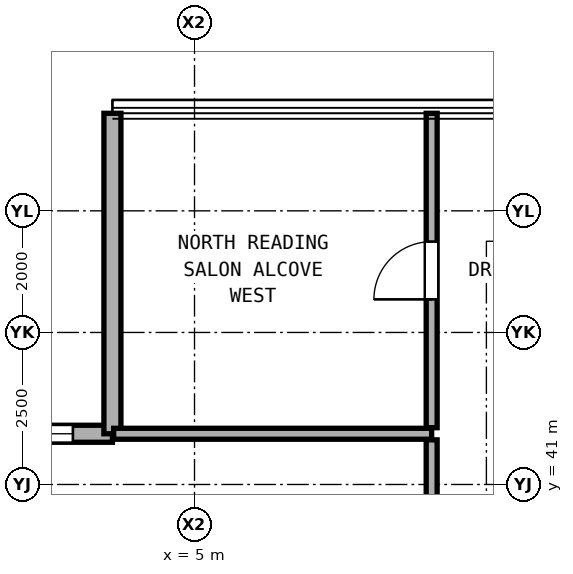
"""IFC4 building model, lengths in metres.
Left out: names, types, materials, properties, quantities, classifications, styles, units other than length and angle.
Written with IfcOpenShell. Run it as: python <this file> out.ifc"""

import sys

from ifc_helpers import new_model, si_unit, direction, frame, frame_2d, origin, place, context, subcontext, project, spatial, rectangle, extrude, element, fill, save


model = new_model("IFC4")
c1 = context("Model", 3, precision=1e-05, world=origin(), true_north=direction((0.0, 1.0)))
c2 = subcontext(c1, "Body", "Model", "MODEL_VIEW")
j1 = project(units=[si_unit("LENGTHUNIT", "METRE"), si_unit("PLANEANGLEUNIT", "RADIAN")], contexts=[c1])
p1 = place(None, origin())
s1 = spatial("IfcSite", under=j1, at=p1, CompositionType="ELEMENT")
p2 = place(p1, origin())
s2 = spatial("IfcBuilding", under=s1, at=p2, CompositionType="ELEMENT")
p3 = place(p2, frame((0.0, 0.0, 144.5)))
s3 = spatial("IfcBuildingStorey", under=s2, at=p3, CompositionType="ELEMENT", Elevation=144.5)
p4 = place(p3, frame((3.65, 41.834, 0.0), z_axis=(0.0, 0.0, 1.0), x_axis=(-1.0, 0.0, 0.0)))
e1 = element("IfcWall", 1, at=p4, inside=s3, PredefinedType="SOLIDWALL", context=c2, shape_type="SweptSolid", body=[
    extrude(rectangle(XDim=5.27, YDim=0.28, at=frame_2d((2.635, 0.0))), origin(), (0.0, 0.0, 1.0), 2.56),
])
p5 = place(p4, frame((0.65, 0.0, 0.41)))
e2 = element("IfcOpeningElement", 2, at=p5, cuts=e1, PredefinedType="OPENING", context=c2, shape_type="SweptSolid", body=[
    extrude(rectangle(XDim=1.1, YDim=2.0, at=frame_2d((0.55, 1.0))), frame((0.0, 0.15, 0.0), z_axis=(0.0, -1.0, 0.0), x_axis=(1.0, 0.0, 0.0)), (0.0, 0.0, 1.0), 0.3),
])
p6 = place(p3, frame((3.65, 47.104, 0.0), z_axis=(0.0, 0.0, 1.0), x_axis=(0.0, -1.0, 0.0)))
e3 = element("IfcWall", 3, at=p6, inside=s3, PredefinedType="SOLIDWALL", context=c2, shape_type="SweptSolid", body=[
    extrude(rectangle(XDim=5.27, YDim=0.28, at=frame_2d((2.635, 0.0))), origin(), (0.0, 0.0, 1.0), 2.56),
])
p7 = place(p3, frame((3.67, 41.834, 0.0), z_axis=(0.0, 0.0, 1.0), x_axis=(1.0, 0.0, 0.0)))
e4 = element("IfcWall", 4, at=p7, inside=s3, PredefinedType="PARTITIONING", context=c2, shape_type="SweptSolid", body=[
    extrude(rectangle(XDim=5.23, YDim=0.18, at=frame_2d((2.615, 0.0))), origin(), (0.0, 0.0, 1.0), 2.94),
])
p8 = place(p3, frame((8.9, 37.405, 0.0), z_axis=(0.0, 0.0, 1.0), x_axis=(0.0, 1.0, 0.0)))
e5 = element("IfcWall", 5, at=p8, inside=s3, PredefinedType="PARTITIONING", context=c2, shape_type="SweptSolid", body=[
    extrude(rectangle(XDim=4.329, YDim=0.18, at=frame_2d((2.165, 0.0))), origin(), (0.0, 0.0, 1.0), 2.316),
])
p9 = place(p8, frame((0.689, 0.0, 0.0)))
e6 = element("IfcOpeningElement", 6, at=p9, cuts=e5, PredefinedType="OPENING", context=c2, shape_type="SweptSolid", body=[
    extrude(rectangle(XDim=1.05, YDim=2.2, at=frame_2d((0.525, 1.1))), frame((0.0, 0.1, 0.0), z_axis=(0.0, -1.0, 0.0), x_axis=(1.0, 0.0, 0.0)), (0.0, 0.0, 1.0), 0.2),
])
p10 = place(p3, frame((8.9, 41.934, 0.0), z_axis=(0.0, 0.0, 1.0), x_axis=(0.0, 1.0, 0.0)))
e7 = element("IfcWall", 7, at=p10, inside=s3, PredefinedType="PARTITIONING", context=c2, shape_type="SweptSolid", body=[
    extrude(rectangle(XDim=5.17, YDim=0.18, at=frame_2d((2.585, 0.0))), origin(), (0.0, 0.0, 1.0), 2.94),
])
p11 = place(p10, frame((2.11, 0.0, 0.0)))
e8 = element("IfcOpeningElement", 8, at=p11, cuts=e7, PredefinedType="OPENING", context=c2, shape_type="SweptSolid", body=[
    extrude(rectangle(XDim=0.95, YDim=2.15, at=frame_2d((0.475, 1.075))), frame((0.0, 0.1, 0.0), z_axis=(0.0, -1.0, 0.0), x_axis=(1.0, 0.0, 0.0)), (0.0, 0.0, 1.0), 0.2),
])
p12 = place(p5, origin())
e9 = element("IfcWindow", 9, at=p12, inside=s3, PartitioningType="SINGLE_PANEL", PredefinedType="WINDOW", context=c2, shape_type="SweptSolid", body=[
    extrude(rectangle(XDim=1.1, YDim=2.0, at=frame_2d((0.55, 1.0))), frame((0.0, 0.03, 0.0), z_axis=(0.0, -1.0, 0.0), x_axis=(1.0, 0.0, 0.0)), (0.0, 0.0, 1.0), 0.06),
])
fill(e2, e9)
p13 = place(p11, origin())
e10 = element("IfcDoor", 10, at=p13, inside=s3, OperationType="SINGLE_SWING_LEFT", PredefinedType="DOOR", context=c2, shape_type="SweptSolid", body=[
    extrude(rectangle(XDim=0.95, YDim=2.15, at=frame_2d((0.475, 1.075))), frame((0.0, 0.025, 0.0), z_axis=(0.0, -1.0, 0.0), x_axis=(1.0, 0.0, 0.0)), (0.0, 0.0, 1.0), 0.05),
])
fill(e8, e10)
save(model, sys.argv[1])
